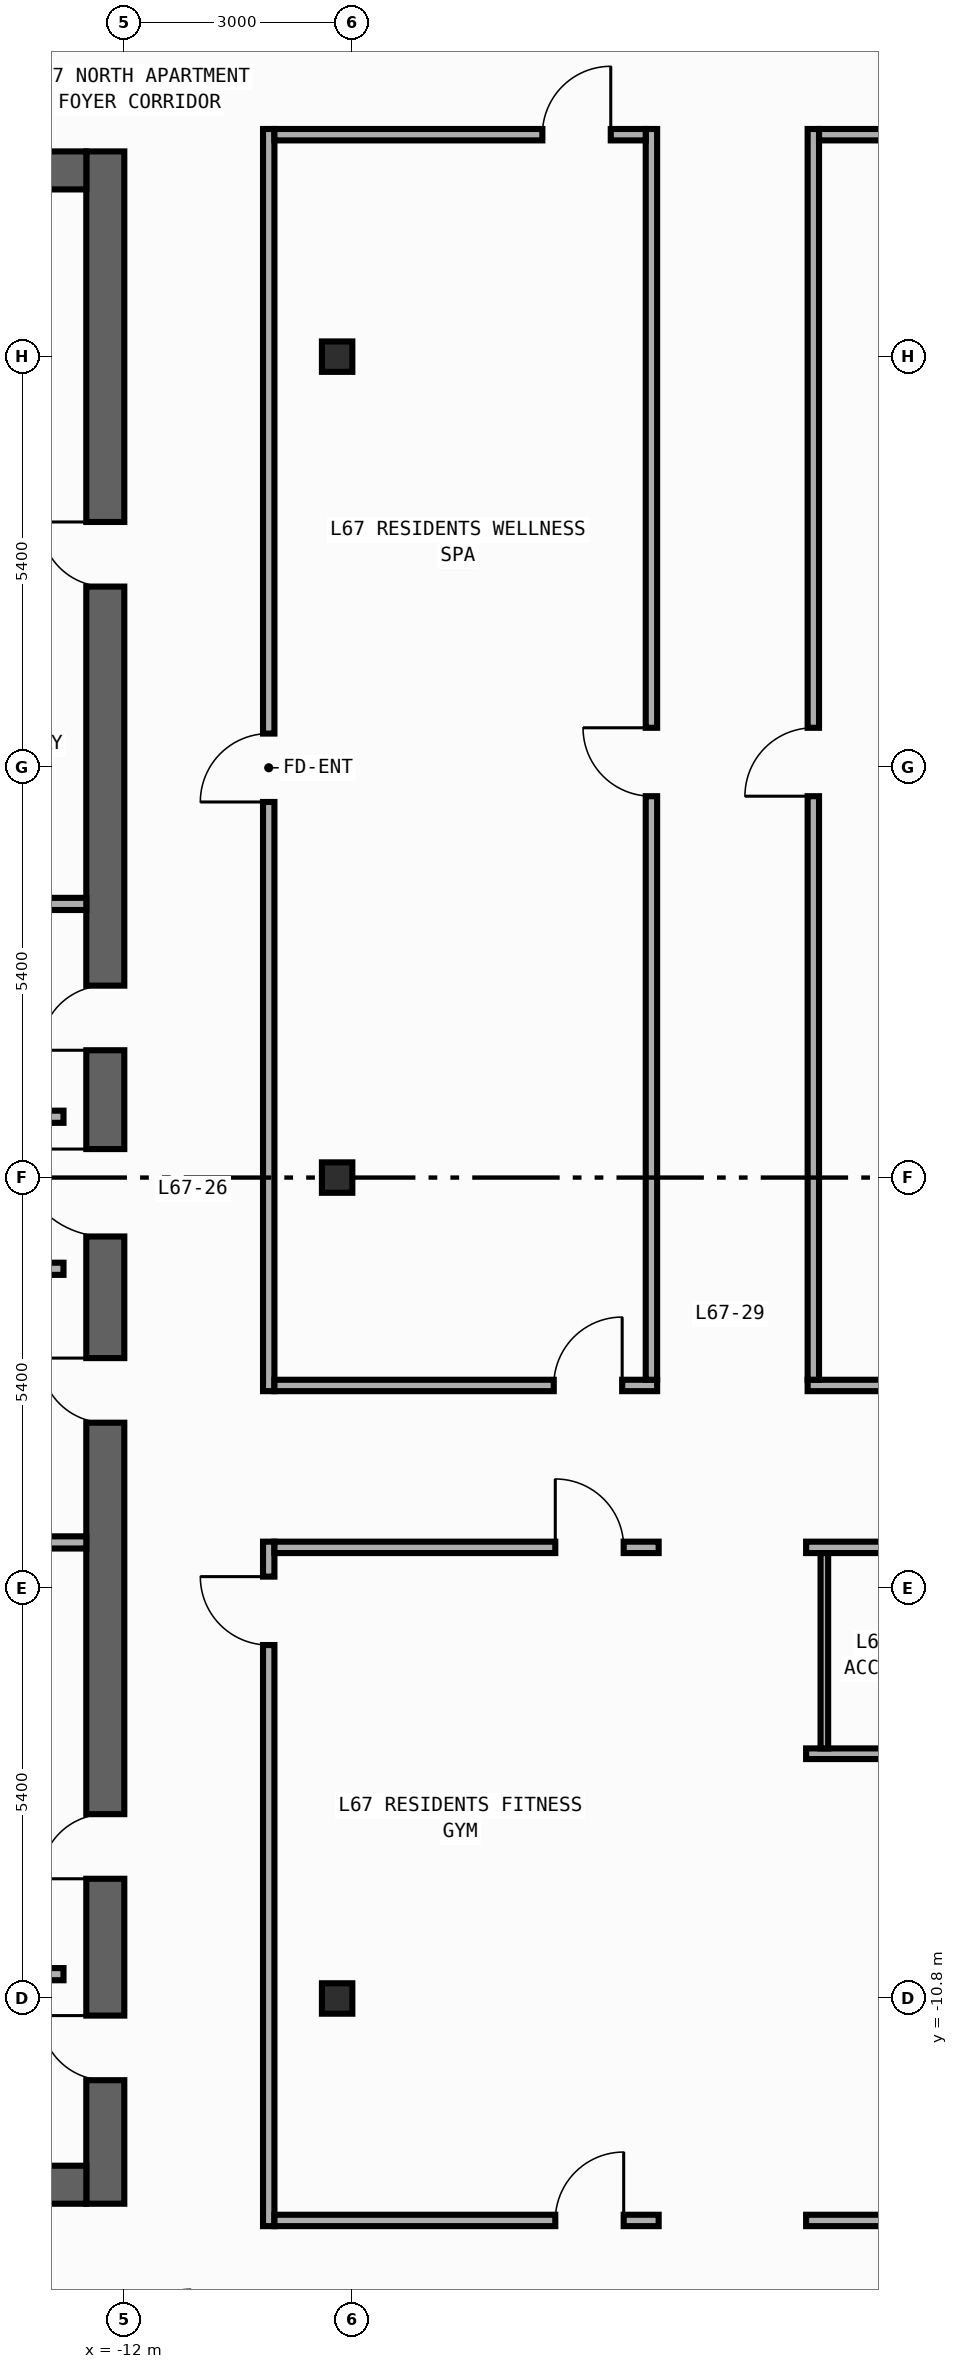
"""IFC4 building model, lengths in metres.
Left out: names, types, materials, properties, quantities, classifications, styles, units other than length and angle.
Written with IfcOpenShell. Run it as: python <this file> out.ifc"""

import sys

from ifc_helpers import new_model, si_unit, direction, frame, frame_2d, origin, origin_2d, place, context, subcontext, project, spatial, rectangle, i_section, extrude, element, fill, save


model = new_model("IFC4")
c1 = context("Model", 3, precision=1e-05, world=origin(), true_north=direction((0.0, 1.0)))
c2 = subcontext(c1, "Body", "Model", "MODEL_VIEW")
j1 = project(units=[si_unit("LENGTHUNIT", "METRE"), si_unit("PLANEANGLEUNIT", "RADIAN")], contexts=[c1])
p1 = place(None, origin())
s1 = spatial("IfcSite", under=j1, at=p1, CompositionType="ELEMENT")
p2 = place(p1, origin())
s2 = spatial("IfcBuilding", under=s1, at=p2, CompositionType="ELEMENT")
p3 = place(p2, frame((0.0, 0.0, 281.4)))
s3 = spatial("IfcBuildingStorey", under=s2, at=p3, CompositionType="ELEMENT", Elevation=281.4)
p4 = place(p3, frame((-12.25, -13.5, 0.0), z_axis=(0.0, 0.0, 1.0), x_axis=(0.0, 1.0, 0.0)))
e1 = element("IfcWall", 1, at=p4, inside=s3, PredefinedType="SHEAR", context=c2, shape_type="SweptSolid", body=[
    extrude(rectangle(XDim=27.0, YDim=0.5, at=frame_2d((13.5, 0.0))), origin(), (0.0, 0.0, 1.0), 3.54),
])
p5 = place(p4, frame((15.175, 0.0, 0.0)))
e2 = element("IfcOpeningElement", 2, at=p5, cuts=e1, PredefinedType="OPENING", context=c2, shape_type="SweptSolid", body=[
    extrude(rectangle(XDim=0.85, YDim=2.1, at=frame_2d((0.425, 1.05))), frame((0.0, 0.26, 0.0), z_axis=(0.0, -1.0, 0.0), x_axis=(1.0, 0.0, 0.0)), (0.0, 0.0, 1.0), 0.52),
])
p6 = place(p4, frame((21.275, 0.0, 0.0)))
e3 = element("IfcOpeningElement", 3, at=p6, cuts=e1, PredefinedType="OPENING", context=c2, shape_type="SweptSolid", body=[
    extrude(rectangle(XDim=0.85, YDim=2.1, at=frame_2d((0.425, 1.05))), frame((0.0, 0.26, 0.0), z_axis=(0.0, -1.0, 0.0), x_axis=(1.0, 0.0, 0.0)), (0.0, 0.0, 1.0), 0.52),
])
p7 = place(p4, frame((4.275, 0.0, 0.0)))
e4 = element("IfcOpeningElement", 4, at=p7, cuts=e1, PredefinedType="OPENING", context=c2, shape_type="SweptSolid", body=[
    extrude(rectangle(XDim=0.85, YDim=2.1, at=frame_2d((0.425, 1.05))), frame((0.0, 0.26, 0.0), z_axis=(0.0, -1.0, 0.0), x_axis=(1.0, 0.0, 0.0)), (0.0, 0.0, 1.0), 0.52),
])
p8 = place(p4, frame((10.275, 0.0, 0.0)))
e5 = element("IfcOpeningElement", 5, at=p8, cuts=e1, PredefinedType="OPENING", context=c2, shape_type="SweptSolid", body=[
    extrude(rectangle(XDim=0.85, YDim=2.1, at=frame_2d((0.425, 1.05))), frame((0.0, 0.26, 0.0), z_axis=(0.0, -1.0, 0.0), x_axis=(1.0, 0.0, 0.0)), (0.0, 0.0, 1.0), 0.52),
])
p9 = place(p4, frame((12.725, 0.0, 0.0)))
e6 = element("IfcOpeningElement", 6, at=p9, cuts=e1, PredefinedType="OPENING", context=c2, shape_type="SweptSolid", body=[
    extrude(rectangle(XDim=1.15, YDim=2.2, at=frame_2d((0.575, 1.1))), frame((0.0, 0.26, 0.0), z_axis=(0.0, -1.0, 0.0), x_axis=(1.0, 0.0, 0.0)), (0.0, 0.0, 1.0), 0.52),
])
p10 = place(p4, frame((1.625, 0.0, 0.0)))
e7 = element("IfcOpeningElement", 7, at=p10, cuts=e1, PredefinedType="OPENING", context=c2, shape_type="SweptSolid", body=[
    extrude(rectangle(XDim=0.85, YDim=2.1, at=frame_2d((0.425, 1.05))), frame((0.0, 0.26, 0.0), z_axis=(0.0, -1.0, 0.0), x_axis=(1.0, 0.0, 0.0)), (0.0, 0.0, 1.0), 0.52),
])
for number, where, z_axis, x_axis in (
    (8, (-19.9, -13.25, 0.0), (0.0, 0.0, 1.0), (1.0, 0.0, 0.0)),
    (9, (-19.9, 13.25, 0.0), (0.0, 0.0, 1.0), (1.0, 0.0, 0.0)),
):
    element("IfcWall", number, at=place(p3, frame(where, z_axis=z_axis, x_axis=x_axis)), inside=s3, PredefinedType="SHEAR", context=c2, shape_type="SweptSolid", body=[
        extrude(rectangle(XDim=7.4, YDim=0.5, at=frame_2d((3.7, 0.0))), origin(), (0.0, 0.0, 1.0), 3.54),
    ])
for number, where, z_axis, x_axis in (
    (10, (-9.2, -10.8, 0.0), (0.0, 0.0, 1.0), (1.0, 0.0, 0.0)),
    (11, (-9.2, 0.0, 0.0), (0.0, 0.0, 1.0), (1.0, 0.0, 0.0)),
    (12, (-9.2, 10.8, 0.0), (0.0, 0.0, 1.0), (1.0, 0.0, 0.0)),
):
    element("IfcColumn", number, at=place(p3, frame(where, z_axis=z_axis, x_axis=x_axis)), inside=s3, PredefinedType="COLUMN", context=c2, shape_type="SweptSolid", body=[
        extrude(i_section(OverallWidth=0.4, OverallDepth=0.4, WebThickness=0.013, FlangeThickness=0.021, FilletRadius=0.022, at=origin_2d()), origin(), (0.0, 0.0, 1.0), 3.8),
    ])
for number, where, z_axis, x_axis in (
    (13, (-15.4, 0.8, 0.0), (0.0, 0.0, 1.0), (1.0, 0.0, 0.0)),
    (14, (-15.4, -1.2, 0.0), (0.0, 0.0, 1.0), (1.0, 0.0, 0.0)),
    (15, (-15.4, -10.48, 0.0), (0.0, 0.0, 1.0), (1.0, 0.0, 0.0)),
):
    element("IfcWall", number, at=place(p3, frame(where, z_axis=z_axis, x_axis=x_axis)), inside=s3, PredefinedType="STANDARD", context=c2, shape_type="SweptSolid", body=[
        extrude(rectangle(XDim=2.6, YDim=0.16, at=frame_2d((1.3, 0.0))), origin(), (0.0, 0.0, 1.0), 3.54),
    ])
for number, where, z_axis, x_axis in (
    (16, (-15.4, 3.6, 0.0), (0.0, 0.0, 1.0), (1.0, 0.0, 0.0)),
    (17, (-15.4, -4.8, 0.0), (0.0, 0.0, 1.0), (1.0, 0.0, 0.0)),
):
    element("IfcWall", number, at=place(p3, frame(where, z_axis=z_axis, x_axis=x_axis)), inside=s3, PredefinedType="PARTITIONING", context=c2, shape_type="SweptSolid", body=[
        extrude(rectangle(XDim=2.9, YDim=0.16, at=frame_2d((1.45, 0.0))), origin(), (0.0, 0.0, 1.0), 3.54),
    ])
p11 = place(p3, frame((-10.1, -2.81, 0.0), z_axis=(0.0, 0.0, 1.0), x_axis=(0.0, 1.0, 0.0)))
e18 = element("IfcWall", 18, at=p11, inside=s3, PredefinedType="PARTITIONING", context=c2, shape_type="SweptSolid", body=[
    extrude(rectangle(XDim=16.605, YDim=0.15, at=frame_2d((8.302, 0.0))), origin(), (0.0, 0.0, 1.0), 3.54),
])
p12 = place(p11, frame((7.751, 0.0, 0.0)))
e19 = element("IfcOpeningElement", 19, at=p12, cuts=e18, PredefinedType="OPENING", context=c2, shape_type="SweptSolid", body=[
    extrude(rectangle(XDim=0.9, YDim=2.15, at=frame_2d((0.45, 1.075))), frame((0.0, 0.085, 0.0), z_axis=(0.0, -1.0, 0.0), x_axis=(1.0, 0.0, 0.0)), (0.0, 0.0, 1.0), 0.17),
])
p13 = place(p3, frame((-10.1, -13.795, 0.0), z_axis=(0.0, 0.0, 1.0), x_axis=(0.0, 1.0, 0.0)))
e20 = element("IfcWall", 20, at=p13, inside=s3, PredefinedType="PARTITIONING", context=c2, shape_type="SweptSolid", body=[
    extrude(rectangle(XDim=9.005, YDim=0.15, at=frame_2d((4.502, 0.0))), origin(), (0.0, 0.0, 1.0), 3.54),
])
p14 = place(p13, frame((7.645, 0.0, 0.0)))
e21 = element("IfcOpeningElement", 21, at=p14, cuts=e20, PredefinedType="OPENING", context=c2, shape_type="SweptSolid", body=[
    extrude(rectangle(XDim=0.9, YDim=2.15, at=frame_2d((0.45, 1.075))), frame((0.0, 0.085, 0.0), z_axis=(0.0, -1.0, 0.0), x_axis=(1.0, 0.0, 0.0)), (0.0, 0.0, 1.0), 0.17),
])
p15 = place(p3, frame((-10.025, -2.735, 0.0), z_axis=(0.0, 0.0, 1.0), x_axis=(1.0, 0.0, 0.0)))
e22 = element("IfcWall", 22, at=p15, inside=s3, PredefinedType="PARTITIONING", context=c2, shape_type="SweptSolid", body=[
    extrude(rectangle(XDim=5.035, YDim=0.15, at=frame_2d((2.518, 0.0))), origin(), (0.0, 0.0, 1.0), 3.54),
])
p16 = place(p15, frame((3.675, 0.0, 0.0)))
e23 = element("IfcOpeningElement", 23, at=p16, cuts=e22, PredefinedType="OPENING", context=c2, shape_type="SweptSolid", body=[
    extrude(rectangle(XDim=0.9, YDim=2.15, at=frame_2d((0.45, 1.075))), frame((0.0, 0.085, 0.0), z_axis=(0.0, -1.0, 0.0), x_axis=(1.0, 0.0, 0.0)), (0.0, 0.0, 1.0), 0.17),
])
p17 = place(p3, frame((-10.025, -4.865, 0.0), z_axis=(0.0, 0.0, 1.0), x_axis=(1.0, 0.0, 0.0)))
e24 = element("IfcWall", 24, at=p17, inside=s3, PredefinedType="PARTITIONING", context=c2, shape_type="SweptSolid", body=[
    extrude(rectangle(XDim=5.055, YDim=0.15, at=frame_2d((2.527, 0.0))), origin(), (0.0, 0.0, 1.0), 3.54),
])
p18 = place(p17, frame((3.695, 0.0, 0.0)))
e25 = element("IfcOpeningElement", 25, at=p18, cuts=e24, PredefinedType="OPENING", context=c2, shape_type="SweptSolid", body=[
    extrude(rectangle(XDim=0.9, YDim=2.15, at=frame_2d((0.45, 1.075))), frame((0.0, 0.085, 0.0), z_axis=(0.0, -1.0, 0.0), x_axis=(1.0, 0.0, 0.0)), (0.0, 0.0, 1.0), 0.17),
])
p19 = place(p3, frame((-3.01, -2.735, 0.0), z_axis=(0.0, 0.0, 1.0), x_axis=(1.0, 0.0, 0.0)))
e26 = element("IfcWall", 26, at=p19, inside=s3, PredefinedType="PARTITIONING", context=c2, shape_type="SweptSolid", body=[
    extrude(rectangle(XDim=13.035, YDim=0.15, at=frame_2d((6.518, 0.0))), origin(), (0.0, 0.0, 1.0), 3.54),
])
p20 = place(p19, frame((2.463, 0.0, 0.0)))
e27 = element("IfcOpeningElement", 27, at=p20, cuts=e26, PredefinedType="OPENING", context=c2, shape_type="SweptSolid", body=[
    extrude(rectangle(XDim=0.9, YDim=2.15, at=frame_2d((0.45, 1.075))), frame((0.0, 0.085, 0.0), z_axis=(0.0, -1.0, 0.0), x_axis=(1.0, 0.0, 0.0)), (0.0, 0.0, 1.0), 0.17),
])
p21 = place(p3, frame((-3.03, -4.865, 0.0), z_axis=(0.0, 0.0, 1.0), x_axis=(1.0, 0.0, 0.0)))
e28 = element("IfcWall", 28, at=p21, inside=s3, PredefinedType="PARTITIONING", context=c2, shape_type="SweptSolid", body=[
    extrude(rectangle(XDim=3.07, YDim=0.15, at=frame_2d((1.535, 0.0))), origin(), (0.0, 0.0, 1.0), 3.54),
])
p22 = place(p21, frame((1.71, 0.0, 0.0)))
e29 = element("IfcOpeningElement", 29, at=p22, cuts=e28, PredefinedType="OPENING", context=c2, shape_type="SweptSolid", body=[
    extrude(rectangle(XDim=0.9, YDim=2.15, at=frame_2d((0.45, 1.075))), frame((0.0, 0.085, 0.0), z_axis=(0.0, -1.0, 0.0), x_axis=(1.0, 0.0, 0.0)), (0.0, 0.0, 1.0), 0.17),
])
p23 = place(p3, frame((-5.065, -2.66, 0.0), z_axis=(0.0, 0.0, 1.0), x_axis=(0.0, 1.0, 0.0)))
e30 = element("IfcWall", 30, at=p23, inside=s3, PredefinedType="PARTITIONING", context=c2, shape_type="SweptSolid", body=[
    extrude(rectangle(XDim=16.455, YDim=0.15, at=frame_2d((8.228, 0.0))), origin(), (0.0, 0.0, 1.0), 3.19),
])
p24 = place(p23, frame((7.677, 0.0, 0.0)))
e31 = element("IfcOpeningElement", 31, at=p24, cuts=e30, PredefinedType="OPENING", context=c2, shape_type="SweptSolid", body=[
    extrude(rectangle(XDim=0.9, YDim=2.15, at=frame_2d((0.45, 1.075))), frame((0.0, 0.085, 0.0), z_axis=(0.0, -1.0, 0.0), x_axis=(1.0, 0.0, 0.0)), (0.0, 0.0, 1.0), 0.17),
])
p25 = place(p3, frame((-2.935, -2.66, 0.0), z_axis=(0.0, 0.0, 1.0), x_axis=(0.0, 1.0, 0.0)))
e32 = element("IfcWall", 32, at=p25, inside=s3, PredefinedType="PARTITIONING", context=c2, shape_type="SweptSolid", body=[
    extrude(rectangle(XDim=16.455, YDim=0.15, at=frame_2d((8.228, 0.0))), origin(), (0.0, 0.0, 1.0), 3.54),
])
p26 = place(p25, frame((7.677, 0.0, 0.0)))
e33 = element("IfcOpeningElement", 33, at=p26, cuts=e32, PredefinedType="OPENING", context=c2, shape_type="SweptSolid", body=[
    extrude(rectangle(XDim=0.9, YDim=2.15, at=frame_2d((0.45, 1.075))), frame((0.0, 0.085, 0.0), z_axis=(0.0, -1.0, 0.0), x_axis=(1.0, 0.0, 0.0)), (0.0, 0.0, 1.0), 0.17),
])
p27 = place(p3, frame((-10.025, 13.72, 0.0), z_axis=(0.0, 0.0, 1.0), x_axis=(1.0, 0.0, 0.0)))
e34 = element("IfcWall", 34, at=p27, inside=s3, PredefinedType="PARTITIONING", context=c2, shape_type="SweptSolid", body=[
    extrude(rectangle(XDim=4.885, YDim=0.15, at=frame_2d((2.442, 0.0))), origin(), (0.0, 0.0, 1.0), 3.54),
])
p28 = place(p27, frame((3.525, 0.0, 0.0)))
e35 = element("IfcOpeningElement", 35, at=p28, cuts=e34, PredefinedType="OPENING", context=c2, shape_type="SweptSolid", body=[
    extrude(rectangle(XDim=0.9, YDim=2.15, at=frame_2d((0.45, 1.075))), frame((0.0, 0.085, 0.0), z_axis=(0.0, -1.0, 0.0), x_axis=(1.0, 0.0, 0.0)), (0.0, 0.0, 1.0), 0.17),
])
p29 = place(p3, frame((-2.86, 13.72, 0.0), z_axis=(0.0, 0.0, 1.0), x_axis=(1.0, 0.0, 0.0)))
e36 = element("IfcWall", 36, at=p29, inside=s3, PredefinedType="PARTITIONING", context=c2, shape_type="SweptSolid", body=[
    extrude(rectangle(XDim=12.885, YDim=0.15, at=frame_2d((6.442, 0.0))), origin(), (0.0, 0.0, 1.0), 3.54),
])
p30 = place(p29, frame((4.692, 0.0, 0.0)))
e37 = element("IfcOpeningElement", 37, at=p30, cuts=e36, PredefinedType="OPENING", context=c2, shape_type="SweptSolid", body=[
    extrude(rectangle(XDim=0.9, YDim=2.15, at=frame_2d((0.45, 1.075))), frame((0.0, 0.085, 0.0), z_axis=(0.0, -1.0, 0.0), x_axis=(1.0, 0.0, 0.0)), (0.0, 0.0, 1.0), 0.17),
])
p31 = place(p3, frame((-10.025, -13.72, 0.0), z_axis=(0.0, 0.0, 1.0), x_axis=(1.0, 0.0, 0.0)))
e38 = element("IfcWall", 38, at=p31, inside=s3, PredefinedType="PARTITIONING", context=c2, shape_type="SweptSolid", body=[
    extrude(rectangle(XDim=5.055, YDim=0.15, at=frame_2d((2.527, 0.0))), origin(), (0.0, 0.0, 1.0), 3.54),
])
p32 = place(p31, frame((3.695, 0.0, 0.0)))
e39 = element("IfcOpeningElement", 39, at=p32, cuts=e38, PredefinedType="OPENING", context=c2, shape_type="SweptSolid", body=[
    extrude(rectangle(XDim=0.9, YDim=2.15, at=frame_2d((0.45, 1.075))), frame((0.0, 0.085, 0.0), z_axis=(0.0, -1.0, 0.0), x_axis=(1.0, 0.0, 0.0)), (0.0, 0.0, 1.0), 0.17),
])
p33 = place(p3, frame((-3.03, -13.72, 0.0), z_axis=(0.0, 0.0, 1.0), x_axis=(1.0, 0.0, 0.0)))
e40 = element("IfcWall", 40, at=p33, inside=s3, PredefinedType="PARTITIONING", context=c2, shape_type="SweptSolid", body=[
    extrude(rectangle(XDim=13.055, YDim=0.15, at=frame_2d((6.527, 0.0))), origin(), (0.0, 0.0, 1.0), 3.54),
])
p34 = place(p33, frame((4.874, 0.0, 0.0)))
e41 = element("IfcOpeningElement", 41, at=p34, cuts=e40, PredefinedType="OPENING", context=c2, shape_type="SweptSolid", body=[
    extrude(rectangle(XDim=0.9, YDim=2.15, at=frame_2d((0.45, 1.075))), frame((0.0, 0.085, 0.0), z_axis=(0.0, -1.0, 0.0), x_axis=(1.0, 0.0, 0.0)), (0.0, 0.0, 1.0), 0.17),
])
p35 = place(p3, frame((-3.03, -7.58, 0.0), z_axis=(0.0, 0.0, 1.0), x_axis=(1.0, 0.0, 0.0)))
e42 = element("IfcWall", 42, at=p35, inside=s3, PredefinedType="PARTITIONING", context=c2, shape_type="SweptSolid", body=[
    extrude(rectangle(XDim=3.07, YDim=0.14, at=frame_2d((1.535, 0.0))), origin(), (0.0, 0.0, 1.0), 3.54),
])
p36 = place(p3, frame((-2.79, -7.51, 0.0), z_axis=(0.0, 0.0, 1.0), x_axis=(0.0, 1.0, 0.0)))
e43 = element("IfcWall", 43, at=p36, inside=s3, PredefinedType="PARTITIONING", context=c2, shape_type="SweptSolid", body=[
    extrude(rectangle(XDim=2.57, YDim=0.1, at=frame_2d((1.285, 0.0))), origin(), (0.0, 0.0, 1.0), 3.54),
])
p37 = place(p5, origin())
e44 = element("IfcDoor", 44, at=p37, inside=s3, OperationType="SINGLE_SWING_LEFT", PredefinedType="DOOR", context=c2, shape_type="SweptSolid", body=[
    extrude(rectangle(XDim=0.85, YDim=2.1, at=frame_2d((0.425, 1.05))), frame((0.0, 0.025, 0.0), z_axis=(0.0, -1.0, 0.0), x_axis=(1.0, 0.0, 0.0)), (0.0, 0.0, 1.0), 0.05),
])
fill(e2, e44)
p38 = place(p6, origin())
e45 = element("IfcDoor", 45, at=p38, inside=s3, OperationType="SINGLE_SWING_RIGHT", PredefinedType="DOOR", context=c2, shape_type="SweptSolid", body=[
    extrude(rectangle(XDim=0.85, YDim=2.1, at=frame_2d((0.425, 1.05))), frame((0.0, 0.025, 0.0), z_axis=(0.0, -1.0, 0.0), x_axis=(1.0, 0.0, 0.0)), (0.0, 0.0, 1.0), 0.05),
])
fill(e3, e45)
p39 = place(p7, origin())
e46 = element("IfcDoor", 46, at=p39, inside=s3, OperationType="SINGLE_SWING_LEFT", PredefinedType="DOOR", context=c2, shape_type="SweptSolid", body=[
    extrude(rectangle(XDim=0.85, YDim=2.1, at=frame_2d((0.425, 1.05))), frame((0.0, 0.025, 0.0), z_axis=(0.0, -1.0, 0.0), x_axis=(1.0, 0.0, 0.0)), (0.0, 0.0, 1.0), 0.05),
])
fill(e4, e46)
p40 = place(p8, origin())
e47 = element("IfcDoor", 47, at=p40, inside=s3, OperationType="SINGLE_SWING_RIGHT", PredefinedType="DOOR", context=c2, shape_type="SweptSolid", body=[
    extrude(rectangle(XDim=0.85, YDim=2.1, at=frame_2d((0.425, 1.05))), frame((0.0, 0.025, 0.0), z_axis=(0.0, -1.0, 0.0), x_axis=(1.0, 0.0, 0.0)), (0.0, 0.0, 1.0), 0.05),
])
fill(e5, e47)
p41 = place(p9, origin())
e48 = element("IfcDoor", 48, at=p41, inside=s3, OperationType="SINGLE_SWING_RIGHT", PredefinedType="DOOR", context=c2, shape_type="SweptSolid", body=[
    extrude(rectangle(XDim=1.15, YDim=2.2, at=frame_2d((0.575, 1.1))), frame((0.0, 0.025, 0.0), z_axis=(0.0, -1.0, 0.0), x_axis=(1.0, 0.0, 0.0)), (0.0, 0.0, 1.0), 0.05),
])
fill(e6, e48)
p42 = place(p10, origin())
e49 = element("IfcDoor", 49, at=p42, inside=s3, OperationType="SINGLE_SWING_RIGHT", PredefinedType="DOOR", context=c2, shape_type="SweptSolid", body=[
    extrude(rectangle(XDim=0.85, YDim=2.1, at=frame_2d((0.425, 1.05))), frame((0.0, 0.025, 0.0), z_axis=(0.0, -1.0, 0.0), x_axis=(1.0, 0.0, 0.0)), (0.0, 0.0, 1.0), 0.05),
])
fill(e7, e49)
p43 = place(p12, origin())
e50 = element("IfcDoor", 50, at=p43, inside=s3, OperationType="SINGLE_SWING_LEFT", PredefinedType="DOOR", context=c2, shape_type="SweptSolid", body=[
    extrude(rectangle(XDim=0.9, YDim=2.15, at=frame_2d((0.45, 1.075))), frame((0.0, 0.025, 0.0), z_axis=(0.0, -1.0, 0.0), x_axis=(1.0, 0.0, 0.0)), (0.0, 0.0, 1.0), 0.05),
])
fill(e19, e50)
p44 = place(p14, origin())
e51 = element("IfcDoor", 51, at=p44, inside=s3, OperationType="SINGLE_SWING_RIGHT", PredefinedType="DOOR", context=c2, shape_type="SweptSolid", body=[
    extrude(rectangle(XDim=0.9, YDim=2.15, at=frame_2d((0.45, 1.075))), frame((0.0, 0.025, 0.0), z_axis=(0.0, -1.0, 0.0), x_axis=(1.0, 0.0, 0.0)), (0.0, 0.0, 1.0), 0.05),
])
fill(e21, e51)
p45 = place(p16, origin())
e52 = element("IfcDoor", 52, at=p45, inside=s3, OperationType="SINGLE_SWING_RIGHT", PredefinedType="DOOR", context=c2, shape_type="SweptSolid", body=[
    extrude(rectangle(XDim=0.9, YDim=2.15, at=frame_2d((0.45, 1.075))), frame((0.0, 0.025, 0.0), z_axis=(0.0, -1.0, 0.0), x_axis=(1.0, 0.0, 0.0)), (0.0, 0.0, 1.0), 0.05),
])
fill(e23, e52)
p46 = place(p18, origin())
e53 = element("IfcDoor", 53, at=p46, inside=s3, OperationType="SINGLE_SWING_LEFT", PredefinedType="DOOR", context=c2, shape_type="SweptSolid", body=[
    extrude(rectangle(XDim=0.9, YDim=2.15, at=frame_2d((0.45, 1.075))), frame((0.0, 0.025, 0.0), z_axis=(0.0, -1.0, 0.0), x_axis=(1.0, 0.0, 0.0)), (0.0, 0.0, 1.0), 0.05),
])
fill(e25, e53)
p47 = place(p24, origin())
e54 = element("IfcDoor", 54, at=p47, inside=s3, OperationType="SINGLE_SWING_RIGHT", PredefinedType="DOOR", context=c2, shape_type="SweptSolid", body=[
    extrude(rectangle(XDim=0.9, YDim=2.15, at=frame_2d((0.45, 1.075))), frame((0.0, 0.025, 0.0), z_axis=(0.0, -1.0, 0.0), x_axis=(1.0, 0.0, 0.0)), (0.0, 0.0, 1.0), 0.05),
])
fill(e31, e54)
p48 = place(p26, origin())
e55 = element("IfcDoor", 55, at=p48, inside=s3, OperationType="SINGLE_SWING_LEFT", PredefinedType="DOOR", context=c2, shape_type="SweptSolid", body=[
    extrude(rectangle(XDim=0.9, YDim=2.15, at=frame_2d((0.45, 1.075))), frame((0.0, 0.025, 0.0), z_axis=(0.0, -1.0, 0.0), x_axis=(1.0, 0.0, 0.0)), (0.0, 0.0, 1.0), 0.05),
])
fill(e33, e55)
p49 = place(p28, origin())
e56 = element("IfcDoor", 56, at=p49, inside=s3, OperationType="SINGLE_SWING_RIGHT", PredefinedType="DOOR", context=c2, shape_type="SweptSolid", body=[
    extrude(rectangle(XDim=0.9, YDim=2.15, at=frame_2d((0.45, 1.075))), frame((0.0, 0.025, 0.0), z_axis=(0.0, -1.0, 0.0), x_axis=(1.0, 0.0, 0.0)), (0.0, 0.0, 1.0), 0.05),
])
fill(e35, e56)
p50 = place(p32, origin())
e57 = element("IfcDoor", 57, at=p50, inside=s3, OperationType="SINGLE_SWING_RIGHT", PredefinedType="DOOR", context=c2, shape_type="SweptSolid", body=[
    extrude(rectangle(XDim=0.9, YDim=2.15, at=frame_2d((0.45, 1.075))), frame((0.0, 0.025, 0.0), z_axis=(0.0, -1.0, 0.0), x_axis=(1.0, 0.0, 0.0)), (0.0, 0.0, 1.0), 0.05),
])
fill(e39, e57)
save(model, sys.argv[1])
